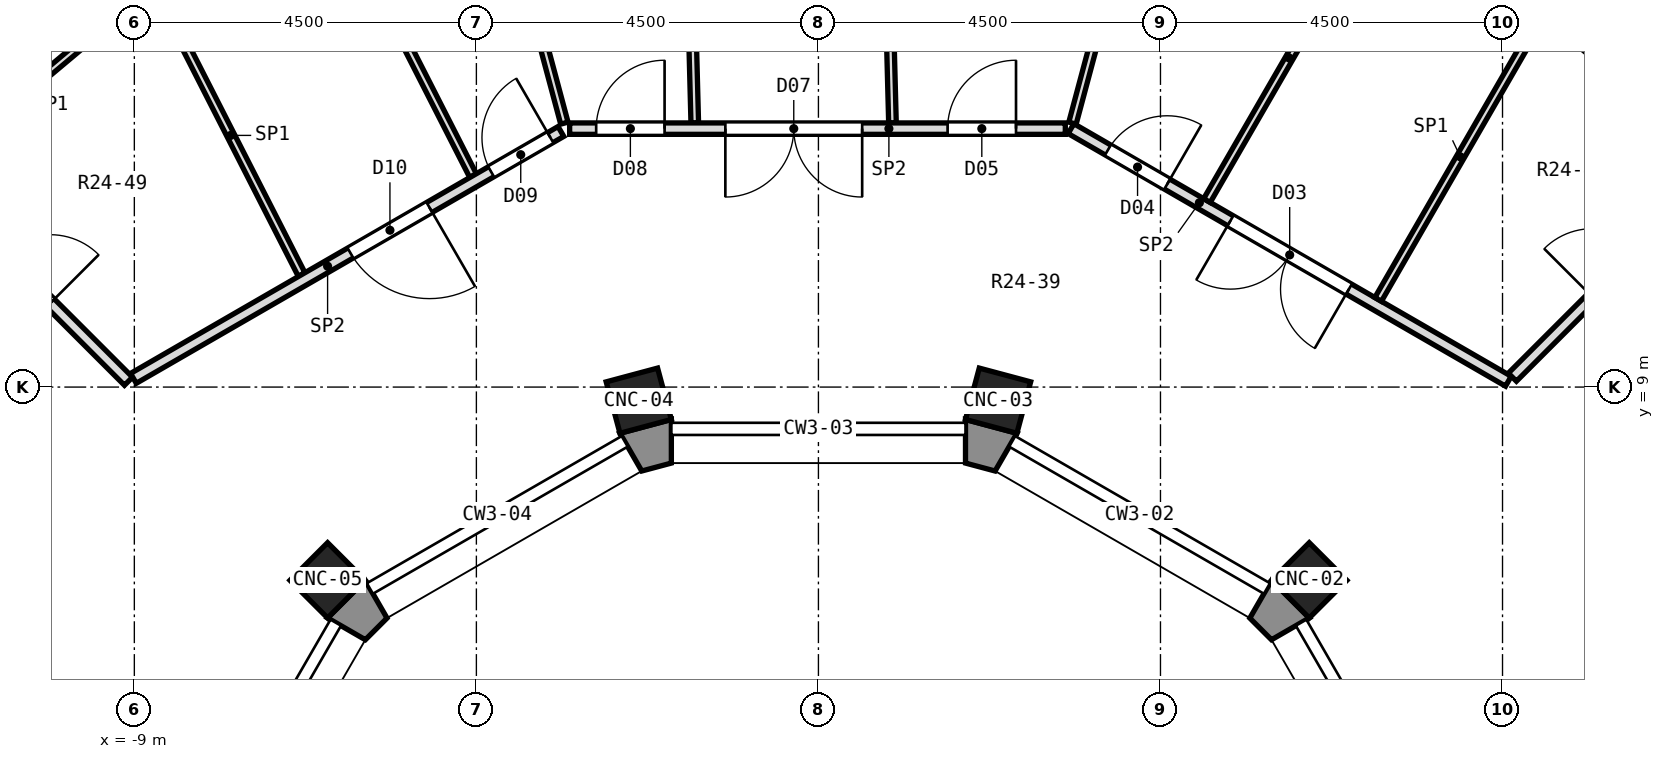
"""IFC4 building model, lengths in metres.
Left out: names, types, materials, properties, quantities, classifications, styles, units other than length and angle.
Written with IfcOpenShell. Run it as: python <this file> out.ifc"""

import sys

from ifc_helpers import new_model, si_unit, direction, frame, frame_2d, origin, origin_2d, place, context, subcontext, project, spatial, polyline, rectangle, outline, extrude, element, fill, save


model = new_model("IFC4")
c1 = context("Model", 3, precision=1e-05, world=origin(), true_north=direction((0.0, 1.0)))
c2 = subcontext(c1, "Body", "Model", "MODEL_VIEW")
j1 = project(units=[si_unit("LENGTHUNIT", "METRE"), si_unit("PLANEANGLEUNIT", "RADIAN")], contexts=[c1])
p1 = place(None, origin())
s1 = spatial("IfcSite", under=j1, at=p1, CompositionType="ELEMENT")
p2 = place(p1, origin())
s2 = spatial("IfcBuilding", under=s1, at=p2, CompositionType="ELEMENT")
p3 = place(p2, frame((0.0, 0.0, 155.8)))
s3 = spatial("IfcBuildingStorey", under=s2, at=p3, CompositionType="ELEMENT", Elevation=155.8)
for number, where, z_axis, x_axis in (
    (1, (6.458, 6.458, 0.0), (0.0, 0.0, 1.0), (0.707, 0.707, 0.0)),
    (2, (2.364, 8.821, 0.0), (0.0, 0.0, 1.0), (0.259, 0.966, 0.0)),
    (3, (-2.364, 8.821, 0.0), (0.0, 0.0, 1.0), (-0.259, 0.966, 0.0)),
    (4, (-6.458, 6.458, 0.0), (0.0, 0.0, 1.0), (-0.707, 0.707, 0.0)),
):
    element("IfcColumn", number, at=place(p3, frame(where, z_axis=z_axis, x_axis=x_axis)), inside=s3, PredefinedType="COLUMN", context=c2, shape_type="SweptSolid", body=[
        extrude(rectangle(XDim=0.7, YDim=0.7, at=origin_2d()), origin(), (0.0, 0.0, 1.0), 5.0),
    ])
p4 = place(p3, origin())
e5 = element("IfcWall", 5, at=p4, inside=s3, PredefinedType="SOLIDWALL", context=c2, shape_type="SweptSolid", body=[
    extrude(outline(polyline([(5.962, 6.458), (5.676, 5.961), (5.961, 5.676), (6.458, 5.962), (5.962, 6.458)])), origin(), (0.0, 0.0, 1.0), 4.55),
])
p5 = place(p3, origin())
e6 = element("IfcWall", 6, at=p5, inside=s3, PredefinedType="SOLIDWALL", context=c2, shape_type="SweptSolid", body=[
    extrude(outline(polyline([(1.935, 8.573), (1.935, 8.0), (2.324, 7.896), (2.611, 8.392), (1.935, 8.573)])), origin(), (0.0, 0.0, 1.0), 4.55),
])
p6 = place(p3, origin())
e7 = element("IfcWall", 7, at=p6, inside=s3, PredefinedType="SOLIDWALL", context=c2, shape_type="SweptSolid", body=[
    extrude(outline(polyline([(-1.935, 8.0), (-1.935, 8.573), (-2.611, 8.392), (-2.324, 7.896), (-1.935, 8.0)])), origin(), (0.0, 0.0, 1.0), 4.55),
])
p7 = place(p3, origin())
e8 = element("IfcWall", 8, at=p7, inside=s3, PredefinedType="SOLIDWALL", context=c2, shape_type="SweptSolid", body=[
    extrude(outline(polyline([(-6.458, 5.962), (-5.961, 5.676), (-5.676, 5.961), (-5.962, 6.458), (-6.458, 5.962)])), origin(), (0.0, 0.0, 1.0), 4.55),
])
p8 = place(p3, frame((-1.751, 17.212, 0.0), z_axis=(0.0, 0.0, 1.0), x_axis=(0.026173897622, -0.999657404856, 0.0)))
e9 = element("IfcWall", 9, at=p8, inside=s3, PredefinedType="PARTITIONING", context=c2, shape_type="SweptSolid", body=[
    extrude(rectangle(XDim=4.739, YDim=0.1, at=frame_2d((2.369, 0.0))), origin(), (0.0, 0.0, 1.0), 4.55),
])
p9 = place(p3, frame((0.849, 17.255, 0.0), z_axis=(0.0, 0.0, 1.0), x_axis=(0.0261428648, -0.999658216902, 0.0)))
e10 = element("IfcWall", 10, at=p9, inside=s3, PredefinedType="PARTITIONING", context=c2, shape_type="SweptSolid", body=[
    extrude(rectangle(XDim=4.781, YDim=0.1, at=frame_2d((2.391, 0.0))), origin(), (0.0, 0.0, 1.0), 4.55),
])
p10 = place(p9, frame((1.928, 0.0, 0.0)))
e11 = element("IfcOpeningElement", 11, at=p10, cuts=e10, PredefinedType="OPENING", context=c2, shape_type="SweptSolid", body=[
    extrude(rectangle(XDim=1.0, YDim=2.1, at=frame_2d((0.5, 1.05))), frame((0.0, 0.062, 0.0), z_axis=(0.0, -1.0, 0.0), x_axis=(1.0, 0.0, 0.0)), (0.0, 0.0, 1.0), 0.124),
])
p11 = place(p3, frame((-6.144, 22.931, 0.0), z_axis=(0.0, 0.0, 1.0), x_axis=(0.258715046682, -0.965953686582, 0.0)))
e12 = element("IfcWall", 12, at=p11, inside=s3, PredefinedType="PARTITIONING", context=c2, shape_type="SweptSolid", body=[
    extrude(rectangle(XDim=10.828, YDim=0.1, at=frame_2d((5.414, 0.0))), origin(), (0.0, 0.0, 1.0), 4.55),
])
p12 = place(p3, frame((-8.665, 14.142, 0.0), z_axis=(0.0, 0.0, 1.0), x_axis=(0.453972049437, -0.891015924847, 0.0)))
e13 = element("IfcWall", 13, at=p12, inside=s3, PredefinedType="PARTITIONING", context=c2, shape_type="SweptSolid", body=[
    extrude(rectangle(XDim=4.11, YDim=0.1, at=frame_2d((2.055, 0.0))), origin(), (0.0, 0.0, 1.0), 4.55),
])
p13 = place(p3, frame((-6.353, 15.332, 0.0), z_axis=(0.0, 0.0, 1.0), x_axis=(0.454013892244, -0.890994604725, 0.0)))
e14 = element("IfcWall", 14, at=p13, inside=s3, PredefinedType="PARTITIONING", context=c2, shape_type="SweptSolid", body=[
    extrude(rectangle(XDim=3.985, YDim=0.1, at=frame_2d((1.992, 0.0))), origin(), (0.0, 0.0, 1.0), 4.55),
])
p14 = place(p3, frame((-13.115, 13.115, 0.0), z_axis=(0.0, 0.0, 1.0), x_axis=(0.707106781187, -0.707106781187, 0.0)))
e15 = element("IfcWall", 15, at=p14, inside=s3, PredefinedType="PARTITIONING", context=c2, shape_type="SweptSolid", body=[
    extrude(rectangle(XDim=5.71, YDim=0.15, at=frame_2d((2.855, 0.0))), origin(), (0.0, 0.0, 1.0), 4.55),
])
p15 = place(p14, frame((3.357, 0.0, 0.0)))
e16 = element("IfcOpeningElement", 16, at=p15, cuts=e15, PredefinedType="OPENING", context=c2, shape_type="SweptSolid", body=[
    extrude(rectangle(XDim=0.9, YDim=2.1, at=frame_2d((0.45, 1.05))), frame((0.0, 0.087, 0.0), z_axis=(0.0, -1.0, 0.0), x_axis=(1.0, 0.0, 0.0)), (0.0, 0.0, 1.0), 0.174),
])
p16 = place(p3, frame((9.676, 13.818, 0.0), z_axis=(0.0, 0.0, 1.0), x_axis=(0.765988490515, -0.64285428551, 0.0)))
e17 = element("IfcWall", 17, at=p16, inside=s3, PredefinedType="PARTITIONING", context=c2, shape_type="SweptSolid", body=[
    extrude(rectangle(XDim=2.865, YDim=0.1, at=frame_2d((1.433, 0.0))), origin(), (0.0, 0.0, 1.0), 4.55),
])
p17 = place(p3, frame((3.323, 12.4, 0.0), z_axis=(0.0, 0.0, 1.0), x_axis=(0.865961614908, -0.500110469302, 0.0)))
e18 = element("IfcWall", 18, at=p17, inside=s3, PredefinedType="PARTITIONING", context=c2, shape_type="SweptSolid", body=[
    extrude(rectangle(XDim=6.645, YDim=0.15, at=frame_2d((3.322, 0.0))), origin(), (0.0, 0.0, 1.0), 4.55),
])
p18 = place(p17, frame((2.422, 0.0, 0.0)))
e19 = element("IfcOpeningElement", 19, at=p18, cuts=e18, PredefinedType="OPENING", context=c2, shape_type="SweptSolid", body=[
    extrude(rectangle(XDim=1.8, YDim=2.1, at=frame_2d((0.9, 1.05))), frame((0.0, 0.087, 0.0), z_axis=(0.0, -1.0, 0.0), x_axis=(1.0, 0.0, 0.0)), (0.0, 0.0, 1.0), 0.174),
])
p19 = place(p17, frame((0.561, 0.0, 0.0)))
e20 = element("IfcOpeningElement", 20, at=p19, cuts=e18, PredefinedType="OPENING", context=c2, shape_type="SweptSolid", body=[
    extrude(rectangle(XDim=0.9, YDim=2.1, at=frame_2d((0.45, 1.05))), frame((0.0, 0.087, 0.0), z_axis=(0.0, -1.0, 0.0), x_axis=(1.0, 0.0, 0.0)), (0.0, 0.0, 1.0), 0.174),
])
p20 = place(p3, frame((-3.273, 12.4, 0.0), z_axis=(0.0, 0.0, 1.0), x_axis=(1.0, 0.0, 0.0)))
e21 = element("IfcWall", 21, at=p20, inside=s3, PredefinedType="PARTITIONING", context=c2, shape_type="SweptSolid", body=[
    extrude(rectangle(XDim=6.521, YDim=0.15, at=frame_2d((3.26, 0.0))), origin(), (0.0, 0.0, 1.0), 4.55),
])
p21 = place(p20, frame((4.972, 0.0, 0.0)))
e22 = element("IfcOpeningElement", 22, at=p21, cuts=e21, PredefinedType="OPENING", context=c2, shape_type="SweptSolid", body=[
    extrude(rectangle(XDim=0.9, YDim=2.1, at=frame_2d((0.45, 1.05))), frame((0.0, 0.087, 0.0), z_axis=(0.0, -1.0, 0.0), x_axis=(1.0, 0.0, 0.0)), (0.0, 0.0, 1.0), 0.174),
])
p22 = place(p20, frame((2.049, 0.0, 0.0)))
e23 = element("IfcOpeningElement", 23, at=p22, cuts=e21, PredefinedType="OPENING", context=c2, shape_type="SweptSolid", body=[
    extrude(rectangle(XDim=1.8, YDim=2.1, at=frame_2d((0.9, 1.05))), frame((0.0, 0.087, 0.0), z_axis=(0.0, -1.0, 0.0), x_axis=(1.0, 0.0, 0.0)), (0.0, 0.0, 1.0), 0.174),
])
p23 = place(p20, frame((0.349, 0.0, 0.0)))
e24 = element("IfcOpeningElement", 24, at=p23, cuts=e21, PredefinedType="OPENING", context=c2, shape_type="SweptSolid", body=[
    extrude(rectangle(XDim=0.9, YDim=2.1, at=frame_2d((0.45, 1.05))), frame((0.0, 0.087, 0.0), z_axis=(0.0, -1.0, 0.0), x_axis=(1.0, 0.0, 0.0)), (0.0, 0.0, 1.0), 0.174),
])
p24 = place(p3, frame((-9.012, 9.115, 0.0), z_axis=(0.0, 0.0, 1.0), x_axis=(0.865967095912, 0.5001009786, 0.0)))
e25 = element("IfcWall", 25, at=p24, inside=s3, PredefinedType="PARTITIONING", context=c2, shape_type="SweptSolid", body=[
    extrude(rectangle(XDim=6.495, YDim=0.15, at=frame_2d((3.248, 0.0))), origin(), (0.0, 0.0, 1.0), 4.55),
])
p25 = place(p24, frame((5.434, 0.0, 0.0)))
e26 = element("IfcOpeningElement", 26, at=p25, cuts=e25, PredefinedType="OPENING", context=c2, shape_type="SweptSolid", body=[
    extrude(rectangle(XDim=0.9, YDim=2.1, at=frame_2d((0.45, 1.05))), frame((0.0, 0.087, 0.0), z_axis=(0.0, -1.0, 0.0), x_axis=(1.0, 0.0, 0.0)), (0.0, 0.0, 1.0), 0.174),
])
p26 = place(p24, frame((3.297, 0.0, 0.0)))
e27 = element("IfcOpeningElement", 27, at=p26, cuts=e25, PredefinedType="OPENING", context=c2, shape_type="SweptSolid", body=[
    extrude(rectangle(XDim=1.2, YDim=2.1, at=frame_2d((0.6, 1.05))), frame((0.0, 0.087, 0.0), z_axis=(0.0, -1.0, 0.0), x_axis=(1.0, 0.0, 0.0)), (0.0, 0.0, 1.0), 0.174),
])
p27 = place(p3, frame((-11.711, 11.817, 0.0), z_axis=(0.0, 0.0, 1.0), x_axis=(0.76626417204, 0.642525656023, 0.0)))
e28 = element("IfcWall", 28, at=p27, inside=s3, PredefinedType="PARTITIONING", context=c2, shape_type="SweptSolid", body=[
    extrude(rectangle(XDim=2.776, YDim=0.1, at=frame_2d((1.388, 0.0))), origin(), (0.0, 0.0, 1.0), 4.55),
])
p28 = place(p3, frame((9.13, 9.13, 0.0), z_axis=(0.0, 0.0, 1.0), x_axis=(0.707106781187, 0.707106781187, 0.0)))
e29 = element("IfcWall", 29, at=p28, inside=s3, PredefinedType="PARTITIONING", context=c2, shape_type="SweptSolid", body=[
    extrude(rectangle(XDim=5.635, YDim=0.15, at=frame_2d((2.817, 0.0))), origin(), (0.0, 0.0, 1.0), 4.55),
])
p29 = place(p28, frame((1.491, 0.0, 0.0)))
e30 = element("IfcOpeningElement", 30, at=p29, cuts=e29, PredefinedType="OPENING", context=c2, shape_type="SweptSolid", body=[
    extrude(rectangle(XDim=0.9, YDim=2.1, at=frame_2d((0.45, 1.05))), frame((0.0, 0.087, 0.0), z_axis=(0.0, -1.0, 0.0), x_axis=(1.0, 0.0, 0.0)), (0.0, 0.0, 1.0), 0.174),
])
p30 = place(p3, frame((7.364, 10.153, 0.0), z_axis=(0.0, 0.0, 1.0), x_axis=(0.499911184982, 0.866076675087, 0.0)))
e31 = element("IfcWall", 31, at=p30, inside=s3, PredefinedType="PARTITIONING", context=c2, shape_type="SweptSolid", body=[
    extrude(rectangle(XDim=4.33, YDim=0.1, at=frame_2d((2.165, 0.0))), origin(), (0.0, 0.0, 1.0), 4.55),
])
p31 = place(p3, frame((5.112, 11.454, 0.0), z_axis=(0.0, 0.0, 1.0), x_axis=(0.500178009373, 0.865922605629, 0.0)))
e32 = element("IfcWall", 32, at=p31, inside=s3, PredefinedType="PARTITIONING", context=c2, shape_type="SweptSolid", body=[
    extrude(rectangle(XDim=4.33, YDim=0.1, at=frame_2d((2.165, 0.0))), origin(), (0.0, 0.0, 1.0), 4.55),
])
p32 = place(p3, frame((3.342, 12.472, 0.0), z_axis=(0.0, 0.0, 1.0), x_axis=(0.258741720617, 0.965946542005, 0.0)))
e33 = element("IfcWall", 33, at=p32, inside=s3, PredefinedType="PARTITIONING", context=c2, shape_type="SweptSolid", body=[
    extrude(rectangle(XDim=10.827, YDim=0.1, at=frame_2d((5.414, 0.0))), origin(), (0.0, 0.0, 1.0), 4.55),
])
p33 = place(p18, frame((1.8, 0.0, 0.0), z_axis=(0.0, 0.0, 1.0), x_axis=(-1.0, 0.0, 0.0)))
e34 = element("IfcDoor", 34, at=p33, inside=s3, OperationType="DOUBLE_DOOR_SINGLE_SWING", PredefinedType="DOOR", context=c2, shape_type="SweptSolid", body=[
    extrude(rectangle(XDim=1.8, YDim=2.1, at=frame_2d((0.9, 1.05))), frame((0.0, 0.025, 0.0), z_axis=(0.0, -1.0, 0.0), x_axis=(1.0, 0.0, 0.0)), (0.0, 0.0, 1.0), 0.05),
])
fill(e19, e34)
p34 = place(p19, origin())
e35 = element("IfcDoor", 35, at=p34, inside=s3, OperationType="SINGLE_SWING_RIGHT", PredefinedType="DOOR", context=c2, shape_type="SweptSolid", body=[
    extrude(rectangle(XDim=0.9, YDim=2.1, at=frame_2d((0.45, 1.05))), frame((0.0, 0.025, 0.0), z_axis=(0.0, -1.0, 0.0), x_axis=(1.0, 0.0, 0.0)), (0.0, 0.0, 1.0), 0.05),
])
fill(e20, e35)
p35 = place(p21, origin())
e36 = element("IfcDoor", 36, at=p35, inside=s3, OperationType="SINGLE_SWING_RIGHT", PredefinedType="DOOR", context=c2, shape_type="SweptSolid", body=[
    extrude(rectangle(XDim=0.9, YDim=2.1, at=frame_2d((0.45, 1.05))), frame((0.0, 0.025, 0.0), z_axis=(0.0, -1.0, 0.0), x_axis=(1.0, 0.0, 0.0)), (0.0, 0.0, 1.0), 0.05),
])
fill(e22, e36)
p36 = place(p22, frame((1.8, 0.0, 0.0), z_axis=(0.0, 0.0, 1.0), x_axis=(-1.0, 0.0, 0.0)))
e37 = element("IfcDoor", 37, at=p36, inside=s3, OperationType="DOUBLE_DOOR_SINGLE_SWING", PredefinedType="DOOR", context=c2, shape_type="SweptSolid", body=[
    extrude(rectangle(XDim=1.8, YDim=2.1, at=frame_2d((0.9, 1.05))), frame((0.0, 0.025, 0.0), z_axis=(0.0, -1.0, 0.0), x_axis=(1.0, 0.0, 0.0)), (0.0, 0.0, 1.0), 0.05),
])
fill(e23, e37)
p37 = place(p23, origin())
e38 = element("IfcDoor", 38, at=p37, inside=s3, OperationType="SINGLE_SWING_RIGHT", PredefinedType="DOOR", context=c2, shape_type="SweptSolid", body=[
    extrude(rectangle(XDim=0.9, YDim=2.1, at=frame_2d((0.45, 1.05))), frame((0.0, 0.025, 0.0), z_axis=(0.0, -1.0, 0.0), x_axis=(1.0, 0.0, 0.0)), (0.0, 0.0, 1.0), 0.05),
])
fill(e24, e38)
p38 = place(p25, origin())
e39 = element("IfcDoor", 39, at=p38, inside=s3, OperationType="SINGLE_SWING_RIGHT", PredefinedType="DOOR", context=c2, shape_type="SweptSolid", body=[
    extrude(rectangle(XDim=0.9, YDim=2.1, at=frame_2d((0.45, 1.05))), frame((0.0, 0.025, 0.0), z_axis=(0.0, -1.0, 0.0), x_axis=(1.0, 0.0, 0.0)), (0.0, 0.0, 1.0), 0.05),
])
fill(e26, e39)
p39 = place(p26, frame((1.2, 0.0, 0.0), z_axis=(0.0, 0.0, 1.0), x_axis=(-1.0, 0.0, 0.0)))
e40 = element("IfcDoor", 40, at=p39, inside=s3, OperationType="SINGLE_SWING_LEFT", PredefinedType="DOOR", context=c2, shape_type="SweptSolid", body=[
    extrude(rectangle(XDim=1.2, YDim=2.1, at=frame_2d((0.6, 1.05))), frame((0.0, 0.025, 0.0), z_axis=(0.0, -1.0, 0.0), x_axis=(1.0, 0.0, 0.0)), (0.0, 0.0, 1.0), 0.05),
])
fill(e27, e40)
save(model, sys.argv[1])
